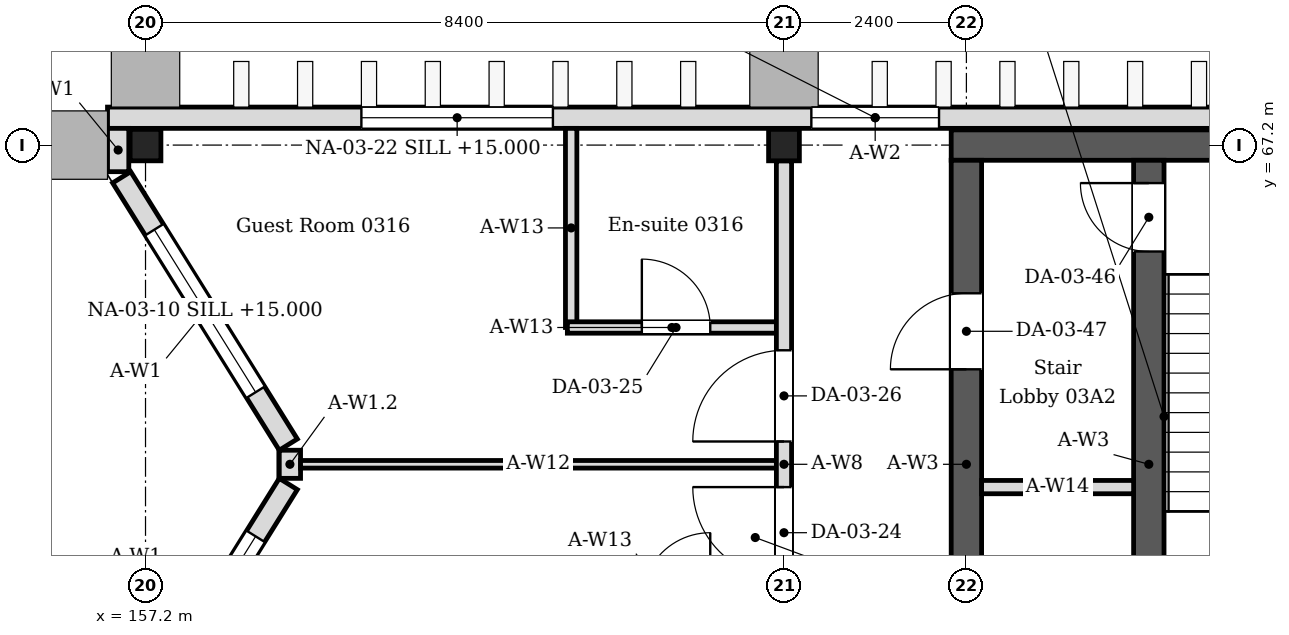
"""IFC4 building model, lengths in metres.
Left out: names, types, materials, properties, quantities, classifications, styles, units other than length and angle.
Written with IfcOpenShell. Run it as: python <this file> out.ifc"""

import sys

from ifc_helpers import new_model, si_unit, direction, frame, frame_2d, origin, origin_2d, place, context, subcontext, project, spatial, rectangle, i_section, extrude, element, fill, save


model = new_model("IFC4")
c1 = context("Model", 3, precision=1e-05, world=origin(), true_north=direction((0.0, 1.0)))
c2 = subcontext(c1, "Body", "Model", "MODEL_VIEW")
j1 = project(units=[si_unit("LENGTHUNIT", "METRE"), si_unit("PLANEANGLEUNIT", "RADIAN")], contexts=[c1])
p1 = place(None, origin())
s1 = spatial("IfcSite", under=j1, at=p1, CompositionType="ELEMENT")
p2 = place(p1, origin())
s2 = spatial("IfcBuilding", under=s1, at=p2, CompositionType="ELEMENT")
p3 = place(p2, frame((0.0, 0.0, 14.4)))
s3 = spatial("IfcBuildingStorey", under=s2, at=p3, CompositionType="ELEMENT", Elevation=14.4)
for number, where, z_axis, x_axis in (
    (1, (157.2, 67.2, 0.0), (0.0, 0.0, 1.0), (1.0, 0.0, 0.0)),
    (2, (165.6, 67.2, 0.0), (0.0, 0.0, 1.0), (1.0, 0.0, 0.0)),
):
    element("IfcColumn", number, at=place(p3, frame(where, z_axis=z_axis, x_axis=x_axis)), inside=s3, PredefinedType="COLUMN", context=c2, shape_type="SweptSolid", body=[
        extrude(i_section(OverallWidth=0.405, OverallDepth=0.414, WebThickness=0.018, FlangeThickness=0.028, FilletRadius=0.022, at=origin_2d()), origin(), (0.0, 0.0, 1.0), 4.2),
    ])
p4 = place(p3, frame((167.8, 67.2, 0.0), z_axis=(0.0, 0.0, 1.0), x_axis=(1.0, 0.0, 0.0)))
e3 = element("IfcWall", 3, at=p4, inside=s3, PredefinedType="SOLIDWALL", context=c2, shape_type="SweptSolid", body=[
    extrude(rectangle(XDim=8.8, YDim=0.4, at=frame_2d((4.4, 0.0))), origin(), (0.0, 0.0, 1.0), 4.05),
])
p5 = place(p3, frame((168.0, 59.0, 0.0), z_axis=(0.0, 0.0, 1.0), x_axis=(0.0, 1.0, 0.0)))
e4 = element("IfcWall", 4, at=p5, inside=s3, PredefinedType="SOLIDWALL", context=c2, shape_type="SweptSolid", body=[
    extrude(rectangle(XDim=8.0, YDim=0.4, at=frame_2d((4.0, 0.0))), origin(), (0.0, 0.0, 1.0), 4.05),
])
p6 = place(p5, frame((5.25, 0.0, 0.0)))
e5 = element("IfcOpeningElement", 5, at=p6, cuts=e4, PredefinedType="OPENING", context=c2, shape_type="SweptSolid", body=[
    extrude(rectangle(XDim=1.0, YDim=2.1, at=frame_2d((0.5, 1.05))), frame((0.0, 0.21, 0.0), z_axis=(0.0, -1.0, 0.0), x_axis=(1.0, 0.0, 0.0)), (0.0, 0.0, 1.0), 0.42),
])
p7 = place(p5, frame((1.275, 0.0, 0.0)))
e6 = element("IfcOpeningElement", 6, at=p7, cuts=e4, PredefinedType="OPENING", context=c2, shape_type="SweptSolid", body=[
    extrude(rectangle(XDim=1.05, YDim=2.1, at=frame_2d((0.525, 1.05))), frame((0.0, 0.21, 0.0), z_axis=(0.0, -1.0, 0.0), x_axis=(1.0, 0.0, 0.0)), (0.0, 0.0, 1.0), 0.42),
])
p8 = place(p3, frame((156.886, 59.224, 0.0), z_axis=(0.0, 0.0, 1.0), x_axis=(0.529018946142, 0.848610013271, 0.0)))
e7 = element("IfcWall", 7, at=p8, inside=s3, PredefinedType="SOLIDWALL", context=c2, shape_type="SweptSolid", body=[
    extrude(rectangle(XDim=4.144, YDim=0.28, at=frame_2d((2.072, 0.0))), origin(), (0.0, 0.0, 1.0), 4.05),
])
p9 = place(p8, frame((0.812, 0.0, 0.6)))
e8 = element("IfcOpeningElement", 8, at=p9, cuts=e7, PredefinedType="OPENING", context=c2, shape_type="SweptSolid", body=[
    extrude(rectangle(XDim=2.52, YDim=2.4, at=frame_2d((1.26, 1.2))), frame((0.0, 0.15, 0.0), z_axis=(0.0, -1.0, 0.0), x_axis=(1.0, 0.0, 0.0)), (0.0, 0.0, 1.0), 0.3),
])
p10 = place(p3, frame((159.079, 63.259, 0.0), z_axis=(0.0, 0.0, 1.0), x_axis=(-0.529018946142, 0.848610013271, 0.0)))
e9 = element("IfcWall", 9, at=p10, inside=s3, PredefinedType="SOLIDWALL", context=c2, shape_type="SweptSolid", body=[
    extrude(rectangle(XDim=4.144, YDim=0.28, at=frame_2d((2.072, 0.0))), origin(), (0.0, 0.0, 1.0), 4.05),
])
p11 = place(p10, frame((0.812, 0.0, 0.6)))
e10 = element("IfcOpeningElement", 10, at=p11, cuts=e9, PredefinedType="OPENING", context=c2, shape_type="SweptSolid", body=[
    extrude(rectangle(XDim=2.52, YDim=2.4, at=frame_2d((1.26, 1.2))), frame((0.0, 0.15, 0.0), z_axis=(0.0, -1.0, 0.0), x_axis=(1.0, 0.0, 0.0)), (0.0, 0.0, 1.0), 0.3),
])
p12 = place(p3, frame((159.1, 62.815, 0.0), z_axis=(0.0, 0.0, 1.0), x_axis=(0.0, 1.0, 0.0)))
e11 = element("IfcWall", 11, at=p12, inside=s3, PredefinedType="SOLIDWALL", context=c2, shape_type="SweptSolid", body=[
    extrude(rectangle(XDim=0.37, YDim=0.28, at=frame_2d((0.185, 0.0))), origin(), (0.0, 0.0, 1.0), 3.604),
])
p13 = place(p3, frame((156.84, 66.85, 0.0), z_axis=(0.0, 0.0, 1.0), x_axis=(0.0, 1.0, 0.0)))
e12 = element("IfcWall", 12, at=p13, inside=s3, PredefinedType="SOLIDWALL", context=c2, shape_type="SweptSolid", body=[
    extrude(rectangle(XDim=0.57, YDim=0.28, at=frame_2d((0.285, 0.0))), origin(), (0.0, 0.0, 1.0), 4.05),
])
p14 = place(p3, frame((156.7, 67.56, 0.0), z_axis=(0.0, 0.0, 1.0), x_axis=(1.0, 0.0, 0.0)))
e13 = element("IfcWall", 13, at=p14, inside=s3, PredefinedType="SOLIDWALL", context=c2, shape_type="SweptSolid", body=[
    extrude(rectangle(XDim=20.2, YDim=0.28, at=frame_2d((10.1, 0.0))), origin(), (0.0, 0.0, 1.0), 4.05),
])
p15 = place(p14, frame((9.26, 0.0, 0.6)))
e14 = element("IfcOpeningElement", 14, at=p15, cuts=e13, PredefinedType="OPENING", context=c2, shape_type="SweptSolid", body=[
    extrude(rectangle(XDim=1.68, YDim=2.4, at=frame_2d((0.84, 1.2))), frame((0.0, 0.15, 0.0), z_axis=(0.0, -1.0, 0.0), x_axis=(1.0, 0.0, 0.0)), (0.0, 0.0, 1.0), 0.3),
])
p16 = place(p14, frame((3.34, 0.0, 0.6)))
e15 = element("IfcOpeningElement", 15, at=p16, cuts=e13, PredefinedType="OPENING", context=c2, shape_type="SweptSolid", body=[
    extrude(rectangle(XDim=2.52, YDim=2.4, at=frame_2d((1.26, 1.2))), frame((0.0, 0.15, 0.0), z_axis=(0.0, -1.0, 0.0), x_axis=(1.0, 0.0, 0.0)), (0.0, 0.0, 1.0), 0.3),
])
p17 = place(p3, frame((162.8, 64.8, 0.0), z_axis=(0.0, 0.0, 1.0), x_axis=(0.0, 1.0, 0.0)))
e16 = element("IfcWall", 16, at=p17, inside=s3, PredefinedType="PARTITIONING", context=c2, shape_type="SweptSolid", body=[
    extrude(rectangle(XDim=2.62, YDim=0.15, at=frame_2d((1.31, 0.0))), origin(), (0.0, 0.0, 1.0), 4.05),
])
p18 = place(p3, frame((162.75, 64.8, 0.0), z_axis=(0.0, 0.0, 1.0), x_axis=(1.0, 0.0, 0.0)))
e17 = element("IfcWall", 17, at=p18, inside=s3, PredefinedType="PARTITIONING", context=c2, shape_type="SweptSolid", body=[
    extrude(rectangle(XDim=2.75, YDim=0.15, at=frame_2d((1.375, 0.0))), origin(), (0.0, 0.0, 1.0), 4.05),
])
p19 = place(p18, frame((0.98, 0.0, 0.0)))
e18 = element("IfcOpeningElement", 18, at=p19, cuts=e17, PredefinedType="OPENING", context=c2, shape_type="SweptSolid", body=[
    extrude(rectangle(XDim=0.9, YDim=2.1, at=frame_2d((0.45, 1.05))), frame((0.0, 0.085, 0.0), z_axis=(0.0, -1.0, 0.0), x_axis=(1.0, 0.0, 0.0)), (0.0, 0.0, 1.0), 0.17),
])
p20 = place(p3, frame((159.24, 63.0, 0.0), z_axis=(0.0, 0.0, 1.0), x_axis=(1.0, 0.0, 0.0)))
e19 = element("IfcWall", 19, at=p20, inside=s3, PredefinedType="PARTITIONING", context=c2, shape_type="SweptSolid", body=[
    extrude(rectangle(XDim=6.26, YDim=0.1, at=frame_2d((3.13, 0.0))), origin(), (0.0, 0.0, 1.0), 3.604),
])
p21 = place(p3, frame((165.6, 59.007, 0.0), z_axis=(0.0, 0.0, 1.0), x_axis=(0.0, 1.0, 0.0)))
e20 = element("IfcWall", 20, at=p21, inside=s3, PredefinedType="PARTITIONING", context=c2, shape_type="SweptSolid", body=[
    extrude(rectangle(XDim=7.986, YDim=0.2, at=frame_2d((3.993, 0.0))), origin(), (0.0, 0.0, 1.0), 3.45),
])
p22 = place(p21, frame((2.493, 0.0, 0.0)))
e21 = element("IfcOpeningElement", 21, at=p22, cuts=e20, PredefinedType="OPENING", context=c2, shape_type="SweptSolid", body=[
    extrude(rectangle(XDim=1.2, YDim=2.1, at=frame_2d((0.6, 1.05))), frame((0.0, 0.11, 0.0), z_axis=(0.0, -1.0, 0.0), x_axis=(1.0, 0.0, 0.0)), (0.0, 0.0, 1.0), 0.22),
])
p23 = place(p21, frame((4.293, 0.0, 0.0)))
e22 = element("IfcOpeningElement", 22, at=p23, cuts=e20, PredefinedType="OPENING", context=c2, shape_type="SweptSolid", body=[
    extrude(rectangle(XDim=1.2, YDim=2.1, at=frame_2d((0.6, 1.05))), frame((0.0, 0.11, 0.0), z_axis=(0.0, -1.0, 0.0), x_axis=(1.0, 0.0, 0.0)), (0.0, 0.0, 1.0), 0.22),
])
p24 = place(p3, frame((170.4, 59.0, 0.0), z_axis=(0.0, 0.0, 1.0), x_axis=(0.0, 1.0, 0.0)))
e23 = element("IfcWall", 23, at=p24, inside=s3, PredefinedType="SOLIDWALL", context=c2, shape_type="SweptSolid", body=[
    extrude(rectangle(XDim=8.0, YDim=0.4, at=frame_2d((4.0, 0.0))), origin(), (0.0, 0.0, 1.0), 4.05),
])
p25 = place(p24, frame((6.8, 0.0, 0.0)))
e24 = element("IfcOpeningElement", 24, at=p25, cuts=e23, PredefinedType="OPENING", context=c2, shape_type="SweptSolid", body=[
    extrude(rectangle(XDim=0.9, YDim=2.1, at=frame_2d((0.45, 1.05))), frame((0.0, 0.21, 0.0), z_axis=(0.0, -1.0, 0.0), x_axis=(1.0, 0.0, 0.0)), (0.0, 0.0, 1.0), 0.42),
])
p26 = place(p3, frame((168.2, 62.7, 0.0), z_axis=(0.0, 0.0, 1.0), x_axis=(1.0, 0.0, 0.0)))
e25 = element("IfcWall", 25, at=p26, inside=s3, PredefinedType="PARTITIONING", context=c2, shape_type="SweptSolid", body=[
    extrude(rectangle(XDim=2.0, YDim=0.175, at=frame_2d((1.0, 0.0))), origin(), (0.0, 0.0, 1.0), 4.05),
])
p27 = place(p9, origin())
e26 = element("IfcWindow", 26, at=p27, inside=s3, PartitioningType="SINGLE_PANEL", PredefinedType="WINDOW", context=c2, shape_type="SweptSolid", body=[
    extrude(rectangle(XDim=2.52, YDim=2.4, at=frame_2d((1.26, 1.2))), frame((0.0, 0.03, 0.0), z_axis=(0.0, -1.0, 0.0), x_axis=(1.0, 0.0, 0.0)), (0.0, 0.0, 1.0), 0.06),
])
fill(e8, e26)
p28 = place(p11, origin())
e27 = element("IfcWindow", 27, at=p28, inside=s3, PartitioningType="SINGLE_PANEL", PredefinedType="WINDOW", context=c2, shape_type="SweptSolid", body=[
    extrude(rectangle(XDim=2.52, YDim=2.4, at=frame_2d((1.26, 1.2))), frame((0.0, 0.03, 0.0), z_axis=(0.0, -1.0, 0.0), x_axis=(1.0, 0.0, 0.0)), (0.0, 0.0, 1.0), 0.06),
])
fill(e10, e27)
p29 = place(p15, origin())
e28 = element("IfcWindow", 28, at=p29, inside=s3, PartitioningType="SINGLE_PANEL", PredefinedType="WINDOW", context=c2, shape_type="SweptSolid", body=[
    extrude(rectangle(XDim=1.68, YDim=2.4, at=frame_2d((0.84, 1.2))), frame((0.0, 0.03, 0.0), z_axis=(0.0, -1.0, 0.0), x_axis=(1.0, 0.0, 0.0)), (0.0, 0.0, 1.0), 0.06),
])
fill(e14, e28)
p30 = place(p16, origin())
e29 = element("IfcWindow", 29, at=p30, inside=s3, PartitioningType="SINGLE_PANEL", PredefinedType="WINDOW", context=c2, shape_type="SweptSolid", body=[
    extrude(rectangle(XDim=2.52, YDim=2.4, at=frame_2d((1.26, 1.2))), frame((0.0, 0.03, 0.0), z_axis=(0.0, -1.0, 0.0), x_axis=(1.0, 0.0, 0.0)), (0.0, 0.0, 1.0), 0.06),
])
fill(e15, e29)
p31 = place(p22, origin())
e30 = element("IfcDoor", 30, at=p31, inside=s3, OperationType="SINGLE_SWING_RIGHT", PredefinedType="DOOR", context=c2, shape_type="SweptSolid", body=[
    extrude(rectangle(XDim=1.2, YDim=2.1, at=frame_2d((0.6, 1.05))), frame((0.0, 0.025, 0.0), z_axis=(0.0, -1.0, 0.0), x_axis=(1.0, 0.0, 0.0)), (0.0, 0.0, 1.0), 0.05),
])
fill(e21, e30)
p32 = place(p19, origin())
e31 = element("IfcDoor", 31, at=p32, inside=s3, OperationType="SINGLE_SWING_LEFT", PredefinedType="DOOR", context=c2, shape_type="SweptSolid", body=[
    extrude(rectangle(XDim=0.9, YDim=2.1, at=frame_2d((0.45, 1.05))), frame((0.0, 0.025, 0.0), z_axis=(0.0, -1.0, 0.0), x_axis=(1.0, 0.0, 0.0)), (0.0, 0.0, 1.0), 0.05),
])
fill(e18, e31)
p33 = place(p23, origin())
e32 = element("IfcDoor", 32, at=p33, inside=s3, OperationType="SINGLE_SWING_LEFT", PredefinedType="DOOR", context=c2, shape_type="SweptSolid", body=[
    extrude(rectangle(XDim=1.2, YDim=2.1, at=frame_2d((0.6, 1.05))), frame((0.0, 0.025, 0.0), z_axis=(0.0, -1.0, 0.0), x_axis=(1.0, 0.0, 0.0)), (0.0, 0.0, 1.0), 0.05),
])
fill(e22, e32)
p34 = place(p25, origin())
e33 = element("IfcDoor", 33, at=p34, inside=s3, OperationType="SINGLE_SWING_RIGHT", PredefinedType="DOOR", context=c2, shape_type="SweptSolid", body=[
    extrude(rectangle(XDim=0.9, YDim=2.1, at=frame_2d((0.45, 1.05))), frame((0.0, 0.025, 0.0), z_axis=(0.0, -1.0, 0.0), x_axis=(1.0, 0.0, 0.0)), (0.0, 0.0, 1.0), 0.05),
])
fill(e24, e33)
p35 = place(p6, origin())
e34 = element("IfcDoor", 34, at=p35, inside=s3, OperationType="SINGLE_SWING_LEFT", PredefinedType="DOOR", context=c2, shape_type="SweptSolid", body=[
    extrude(rectangle(XDim=1.0, YDim=2.1, at=frame_2d((0.5, 1.05))), frame((0.0, 0.025, 0.0), z_axis=(0.0, -1.0, 0.0), x_axis=(1.0, 0.0, 0.0)), (0.0, 0.0, 1.0), 0.05),
])
fill(e5, e34)
save(model, sys.argv[1])
